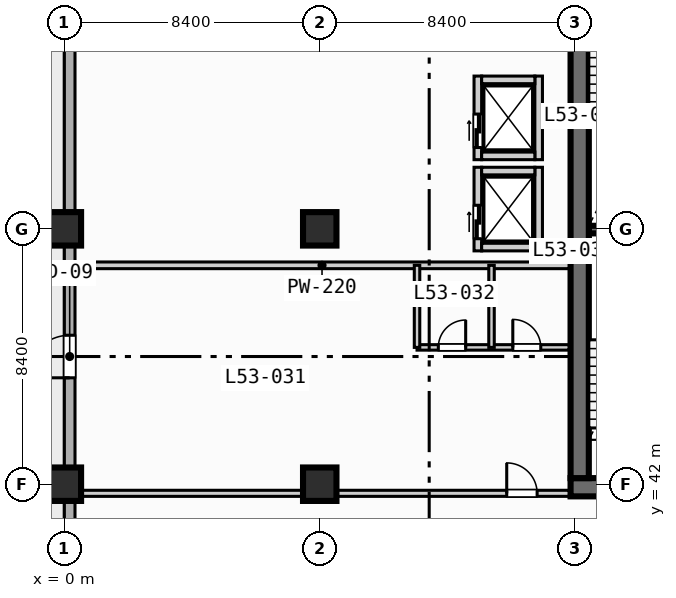
"""IFC4 building model, lengths in metres.
Left out: names, types, materials, properties, quantities, classifications, styles, units other than length and angle.
Written with IfcOpenShell. Run it as: python <this file> out.ifc"""

import sys

from ifc_helpers import new_model, si_unit, direction, frame, frame_2d, origin, origin_2d, place, context, subcontext, project, spatial, rectangle, extrude, element, fill, save


model = new_model("IFC4")
c1 = context("Model", 3, precision=1e-05, world=origin(), true_north=direction((0.0, 1.0)))
c2 = subcontext(c1, "Body", "Model", "MODEL_VIEW")
j1 = project(units=[si_unit("LENGTHUNIT", "METRE"), si_unit("PLANEANGLEUNIT", "RADIAN")], contexts=[c1])
p1 = place(None, origin())
s1 = spatial("IfcSite", under=j1, at=p1, CompositionType="ELEMENT")
p2 = place(p1, origin())
s2 = spatial("IfcBuilding", under=s1, at=p2, CompositionType="ELEMENT")
p3 = place(p2, frame((0.0, 0.0, 216.1)))
s3 = spatial("IfcBuildingStorey", under=s2, at=p3, CompositionType="ELEMENT", Elevation=216.1)
p4 = place(p3, frame((17.25, 50.375, 0.0), z_axis=(0.0, 0.0, 1.0), x_axis=(1.0, 0.0, 0.0)))
e1 = element("IfcWall", 1, at=p4, inside=s3, PredefinedType="SOLIDWALL", context=c2, shape_type="SweptSolid", body=[
    extrude(rectangle(XDim=3.5, YDim=0.25, at=frame_2d((1.75, 0.0))), origin(), (0.0, 0.0, 1.0), 3.47),
])
p5 = place(p3, frame((16.65, 41.9, 0.0), z_axis=(0.0, 0.0, 1.0), x_axis=(1.0, 0.0, 0.0)))
e2 = element("IfcWall", 2, at=p5, inside=s3, PredefinedType="SHEAR", context=c2, shape_type="SweptSolid", body=[
    extrude(rectangle(XDim=1.35, YDim=0.6, at=frame_2d((0.675, 0.0))), origin(), (0.0, 0.0, 1.0), 3.47),
])
p6 = place(p3, frame((16.95, 42.2, 0.0), z_axis=(0.0, 0.0, 1.0), x_axis=(0.0, 1.0, 0.0)))
e3 = element("IfcWall", 3, at=p6, inside=s3, PredefinedType="SHEAR", context=c2, shape_type="SweptSolid", body=[
    extrude(rectangle(XDim=16.35, YDim=0.6, at=frame_2d((8.175, 0.0))), origin(), (0.0, 0.0, 1.0), 3.47),
])
for number, where, z_axis, x_axis in (
    (4, (0.0, 42.0, 0.0), (0.0, 0.0, 1.0), (1.0, 0.0, 0.0)),
    (5, (0.0, 50.4, 0.0), (0.0, 0.0, 1.0), (1.0, 0.0, 0.0)),
    (6, (8.4, 42.0, 0.0), (0.0, 0.0, 1.0), (1.0, 0.0, 0.0)),
    (7, (8.4, 50.4, 0.0), (0.0, 0.0, 1.0), (1.0, 0.0, 0.0)),
):
    element("IfcColumn", number, at=place(p3, frame(where, z_axis=z_axis, x_axis=x_axis)), inside=s3, PredefinedType="COLUMN", context=c2, shape_type="SweptSolid", body=[
        extrude(rectangle(XDim=1.1, YDim=1.1, at=origin_2d()), origin(), (0.0, 0.0, 1.0), 3.7),
    ])
p7 = place(p3, frame((0.175, 3.175, 0.0), z_axis=(0.0, 0.0, 1.0), x_axis=(0.0, 1.0, 0.0)))
e8 = element("IfcWall", 8, at=p7, inside=s3, PredefinedType="STANDARD", context=c2, shape_type="SweptSolid", body=[
    extrude(rectangle(XDim=69.25, YDim=0.35, at=frame_2d((34.625, 0.0))), origin(), (0.0, 0.0, 1.0), 3.47),
])
p8 = place(p7, frame((42.325, 0.0, 0.0)))
e9 = element("IfcOpeningElement", 9, at=p8, cuts=e8, PredefinedType="OPENING", context=c2, shape_type="SweptSolid", body=[
    extrude(rectangle(XDim=1.4, YDim=2.2, at=frame_2d((0.7, 1.1))), frame((0.0, 0.185, 0.0), z_axis=(0.0, -1.0, 0.0), x_axis=(1.0, 0.0, 0.0)), (0.0, 0.0, 1.0), 0.37),
])
p9 = place(p7, frame((25.025, 0.0, 0.85)))
e10 = element("IfcOpeningElement", 10, at=p9, cuts=e8, PredefinedType="OPENING", context=c2, shape_type="SweptSolid", body=[
    extrude(rectangle(XDim=2.4, YDim=1.95, at=frame_2d((1.2, 0.975))), frame((0.0, 0.185, 0.0), z_axis=(0.0, -1.0, 0.0), x_axis=(1.0, 0.0, 0.0)), (0.0, 0.0, 1.0), 0.37),
])
p10 = place(p7, frame((33.725, 0.0, 0.85)))
e11 = element("IfcOpeningElement", 11, at=p10, cuts=e8, PredefinedType="OPENING", context=c2, shape_type="SweptSolid", body=[
    extrude(rectangle(XDim=1.8, YDim=1.8, at=frame_2d((0.9, 0.9))), frame((0.0, 0.185, 0.0), z_axis=(0.0, -1.0, 0.0), x_axis=(1.0, 0.0, 0.0)), (0.0, 0.0, 1.0), 0.37),
])
p11 = place(p7, frame((58.375, 0.0, 0.85)))
e12 = element("IfcOpeningElement", 12, at=p11, cuts=e8, PredefinedType="OPENING", context=c2, shape_type="SweptSolid", body=[
    extrude(rectangle(XDim=1.8, YDim=1.8, at=frame_2d((0.9, 0.9))), frame((0.0, 0.185, 0.0), z_axis=(0.0, -1.0, 0.0), x_axis=(1.0, 0.0, 0.0)), (0.0, 0.0, 1.0), 0.37),
])
p12 = place(p7, frame((64.775, 0.0, 0.85)))
e13 = element("IfcOpeningElement", 13, at=p12, cuts=e8, PredefinedType="OPENING", context=c2, shape_type="SweptSolid", body=[
    extrude(rectangle(XDim=1.8, YDim=1.8, at=frame_2d((0.9, 0.9))), frame((0.0, 0.185, 0.0), z_axis=(0.0, -1.0, 0.0), x_axis=(1.0, 0.0, 0.0)), (0.0, 0.0, 1.0), 0.37),
])
p13 = place(p3, frame((13.6, 49.675, 0.0), z_axis=(0.0, 0.0, 1.0), x_axis=(0.0, 1.0, 0.0)))
e14 = element("IfcWall", 14, at=p13, inside=s3, PredefinedType="SOLIDWALL", context=c2, shape_type="SweptSolid", body=[
    extrude(rectangle(XDim=2.75, YDim=0.25, at=frame_2d((1.375, 0.0))), origin(), (0.0, 0.0, 1.0), 3.47),
])
p14 = place(p13, frame((0.4, 0.0, 0.0)))
e15 = element("IfcOpeningElement", 15, at=p14, cuts=e14, PredefinedType="OPENING", context=c2, shape_type="SweptSolid", body=[
    extrude(rectangle(XDim=1.1, YDim=2.15, at=frame_2d((0.55, 1.075))), frame((0.0, 0.135, 0.0), z_axis=(0.0, -1.0, 0.0), x_axis=(1.0, 0.0, 0.0)), (0.0, 0.0, 1.0), 0.27),
])
p15 = place(p3, frame((15.6, 49.675, 0.0), z_axis=(0.0, 0.0, 1.0), x_axis=(0.0, 1.0, 0.0)))
e16 = element("IfcWall", 16, at=p15, inside=s3, PredefinedType="SOLIDWALL", context=c2, shape_type="SweptSolid", body=[
    extrude(rectangle(XDim=2.75, YDim=0.25, at=frame_2d((1.375, 0.0))), origin(), (0.0, 0.0, 1.0), 3.47),
])
for number, where, z_axis, x_axis in (
    (17, (13.725, 49.8, 0.0), (0.0, 0.0, 1.0), (1.0, 0.0, 0.0)),
    (18, (13.725, 52.3, 0.0), (0.0, 0.0, 1.0), (1.0, 0.0, 0.0)),
):
    element("IfcWall", number, at=place(p3, frame(where, z_axis=z_axis, x_axis=x_axis)), inside=s3, PredefinedType="SOLIDWALL", context=c2, shape_type="SweptSolid", body=[
        extrude(rectangle(XDim=1.75, YDim=0.25, at=frame_2d((0.875, 0.0))), origin(), (0.0, 0.0, 1.0), 3.47),
    ])
p16 = place(p3, frame((13.6, 52.675, 0.0), z_axis=(0.0, 0.0, 1.0), x_axis=(0.0, 1.0, 0.0)))
e19 = element("IfcWall", 19, at=p16, inside=s3, PredefinedType="SOLIDWALL", context=c2, shape_type="SweptSolid", body=[
    extrude(rectangle(XDim=2.75, YDim=0.25, at=frame_2d((1.375, 0.0))), origin(), (0.0, 0.0, 1.0), 3.47),
])
p17 = place(p16, frame((0.4, 0.0, 0.0)))
e20 = element("IfcOpeningElement", 20, at=p17, cuts=e19, PredefinedType="OPENING", context=c2, shape_type="SweptSolid", body=[
    extrude(rectangle(XDim=1.1, YDim=2.15, at=frame_2d((0.55, 1.075))), frame((0.0, 0.135, 0.0), z_axis=(0.0, -1.0, 0.0), x_axis=(1.0, 0.0, 0.0)), (0.0, 0.0, 1.0), 0.27),
])
p18 = place(p3, frame((15.6, 52.675, 0.0), z_axis=(0.0, 0.0, 1.0), x_axis=(0.0, 1.0, 0.0)))
e21 = element("IfcWall", 21, at=p18, inside=s3, PredefinedType="SOLIDWALL", context=c2, shape_type="SweptSolid", body=[
    extrude(rectangle(XDim=2.75, YDim=0.25, at=frame_2d((1.375, 0.0))), origin(), (0.0, 0.0, 1.0), 3.47),
])
for number, where, z_axis, x_axis in (
    (22, (13.725, 52.8, 0.0), (0.0, 0.0, 1.0), (1.0, 0.0, 0.0)),
    (23, (13.725, 55.3, 0.0), (0.0, 0.0, 1.0), (1.0, 0.0, 0.0)),
):
    element("IfcWall", number, at=place(p3, frame(where, z_axis=z_axis, x_axis=x_axis)), inside=s3, PredefinedType="SOLIDWALL", context=c2, shape_type="SweptSolid", body=[
        extrude(rectangle(XDim=1.75, YDim=0.25, at=frame_2d((0.875, 0.0))), origin(), (0.0, 0.0, 1.0), 3.47),
    ])
p19 = place(p3, frame((0.35, 41.7, 0.0), z_axis=(0.0, 0.0, 1.0), x_axis=(1.0, 0.0, 0.0)))
e24 = element("IfcWall", 24, at=p19, inside=s3, PredefinedType="PARTITIONING", context=c2, shape_type="SweptSolid", body=[
    extrude(rectangle(XDim=16.25, YDim=0.2, at=frame_2d((8.125, 0.0))), origin(), (0.0, 0.0, 1.0), 2.82),
])
p20 = place(p19, frame((14.2, 0.0, 0.0)))
e25 = element("IfcOpeningElement", 25, at=p20, cuts=e24, PredefinedType="OPENING", context=c2, shape_type="SweptSolid", body=[
    extrude(rectangle(XDim=1.0, YDim=2.15, at=frame_2d((0.5, 1.075))), frame((0.0, 0.11, 0.0), z_axis=(0.0, -1.0, 0.0), x_axis=(1.0, 0.0, 0.0)), (0.0, 0.0, 1.0), 0.22),
])
p21 = place(p3, frame((0.35, 49.2, 0.0), z_axis=(0.0, 0.0, 1.0), x_axis=(1.0, 0.0, 0.0)))
e26 = element("IfcWall", 26, at=p21, inside=s3, PredefinedType="PARTITIONING", context=c2, shape_type="SweptSolid", body=[
    extrude(rectangle(XDim=16.25, YDim=0.22, at=frame_2d((8.125, 0.0))), origin(), (0.0, 0.0, 1.0), 3.47),
])
p22 = place(p3, frame((11.6, 46.5, 0.0), z_axis=(0.0, 0.0, 1.0), x_axis=(1.0, 0.0, 0.0)))
e27 = element("IfcWall", 27, at=p22, inside=s3, PredefinedType="PLUMBINGWALL", context=c2, shape_type="SweptSolid", body=[
    extrude(rectangle(XDim=5.0, YDim=0.18, at=frame_2d((2.5, 0.0))), origin(), (0.0, 0.0, 1.0), 3.47),
])
p23 = place(p22, frame((0.7, 0.0, 0.0)))
e28 = element("IfcOpeningElement", 28, at=p23, cuts=e27, PredefinedType="OPENING", context=c2, shape_type="SweptSolid", body=[
    extrude(rectangle(XDim=0.9, YDim=2.1, at=frame_2d((0.45, 1.05))), frame((0.0, 0.1, 0.0), z_axis=(0.0, -1.0, 0.0), x_axis=(1.0, 0.0, 0.0)), (0.0, 0.0, 1.0), 0.2),
])
p24 = place(p22, frame((3.15, 0.0, 0.0)))
e29 = element("IfcOpeningElement", 29, at=p24, cuts=e27, PredefinedType="OPENING", context=c2, shape_type="SweptSolid", body=[
    extrude(rectangle(XDim=0.92, YDim=2.1, at=frame_2d((0.46, 1.05))), frame((0.0, 0.1, 0.0), z_axis=(0.0, -1.0, 0.0), x_axis=(1.0, 0.0, 0.0)), (0.0, 0.0, 1.0), 0.2),
])
for number, where, z_axis, x_axis in (
    (30, (11.6, 46.5, 0.0), (0.0, 0.0, 1.0), (0.0, 1.0, 0.0)),
    (31, (14.05, 46.5, 0.0), (0.0, 0.0, 1.0), (0.0, 1.0, 0.0)),
):
    element("IfcWall", number, at=place(p3, frame(where, z_axis=z_axis, x_axis=x_axis)), inside=s3, PredefinedType="PLUMBINGWALL", context=c2, shape_type="SweptSolid", body=[
        extrude(rectangle(XDim=2.7, YDim=0.18, at=frame_2d((1.35, 0.0))), origin(), (0.0, 0.0, 1.0), 3.47),
    ])
p25 = place(p8, origin())
e32 = element("IfcDoor", 32, at=p25, inside=s3, OperationType="SINGLE_SWING_LEFT", PredefinedType="DOOR", context=c2, shape_type="SweptSolid", body=[
    extrude(rectangle(XDim=1.4, YDim=2.2, at=frame_2d((0.7, 1.1))), frame((0.0, 0.025, 0.0), z_axis=(0.0, -1.0, 0.0), x_axis=(1.0, 0.0, 0.0)), (0.0, 0.0, 1.0), 0.05),
])
fill(e9, e32)
p26 = place(p14, origin())
e33 = element("IfcDoor", 33, at=p26, inside=s3, OperationType="SLIDING_TO_LEFT", PredefinedType="DOOR", context=c2, shape_type="SweptSolid", body=[
    extrude(rectangle(XDim=1.1, YDim=2.15, at=frame_2d((0.55, 1.075))), frame((0.0, 0.025, 0.0), z_axis=(0.0, -1.0, 0.0), x_axis=(1.0, 0.0, 0.0)), (0.0, 0.0, 1.0), 0.05),
])
fill(e15, e33)
p27 = place(p17, origin())
e34 = element("IfcDoor", 34, at=p27, inside=s3, OperationType="SLIDING_TO_LEFT", PredefinedType="DOOR", context=c2, shape_type="SweptSolid", body=[
    extrude(rectangle(XDim=1.1, YDim=2.15, at=frame_2d((0.55, 1.075))), frame((0.0, 0.025, 0.0), z_axis=(0.0, -1.0, 0.0), x_axis=(1.0, 0.0, 0.0)), (0.0, 0.0, 1.0), 0.05),
])
fill(e20, e34)
p28 = place(p20, origin())
e35 = element("IfcDoor", 35, at=p28, inside=s3, OperationType="SINGLE_SWING_LEFT", PredefinedType="DOOR", context=c2, shape_type="SweptSolid", body=[
    extrude(rectangle(XDim=1.0, YDim=2.15, at=frame_2d((0.5, 1.075))), frame((0.0, 0.025, 0.0), z_axis=(0.0, -1.0, 0.0), x_axis=(1.0, 0.0, 0.0)), (0.0, 0.0, 1.0), 0.05),
])
fill(e25, e35)
p29 = place(p23, origin())
e36 = element("IfcDoor", 36, at=p29, inside=s3, OperationType="SINGLE_SWING_RIGHT", PredefinedType="DOOR", context=c2, shape_type="SweptSolid", body=[
    extrude(rectangle(XDim=0.9, YDim=2.1, at=frame_2d((0.45, 1.05))), frame((0.0, 0.025, 0.0), z_axis=(0.0, -1.0, 0.0), x_axis=(1.0, 0.0, 0.0)), (0.0, 0.0, 1.0), 0.05),
])
fill(e28, e36)
p30 = place(p24, origin())
e37 = element("IfcDoor", 37, at=p30, inside=s3, OperationType="SINGLE_SWING_LEFT", PredefinedType="DOOR", context=c2, shape_type="SweptSolid", body=[
    extrude(rectangle(XDim=0.92, YDim=2.1, at=frame_2d((0.46, 1.05))), frame((0.0, 0.025, 0.0), z_axis=(0.0, -1.0, 0.0), x_axis=(1.0, 0.0, 0.0)), (0.0, 0.0, 1.0), 0.05),
])
fill(e29, e37)
save(model, sys.argv[1])
